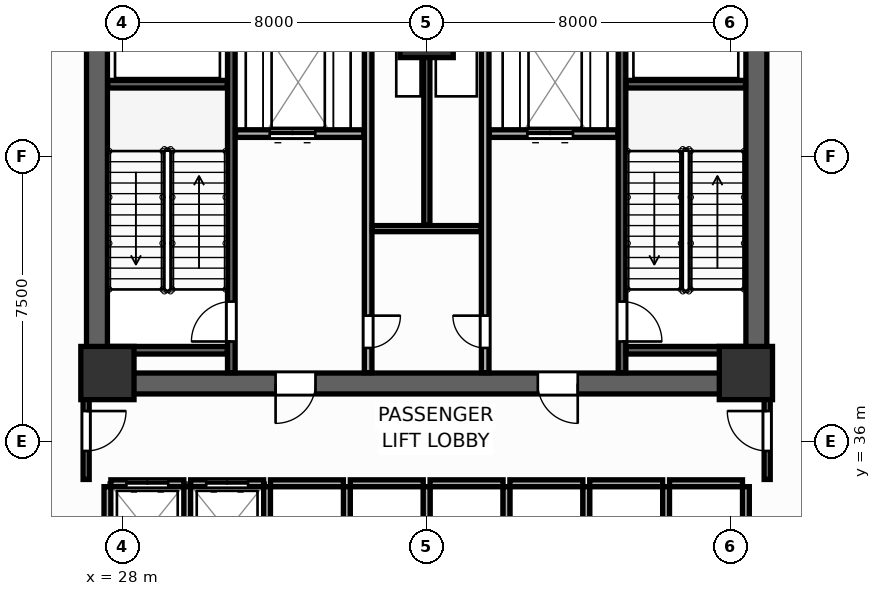
"""IFC4 building model, lengths in metres.
Left out: names, types, materials, properties, quantities, classifications, styles, units other than length and angle.
Written with IfcOpenShell. Run it as: python <this file> out.ifc"""

import sys

from ifc_helpers import new_model, si_unit, direction, frame, frame_2d, origin, origin_2d, place, context, subcontext, project, spatial, rectangle, extrude, source, transform, mapped, element, fill, save


model = new_model("IFC4")
c1 = context("Model", 3, precision=1e-05, world=origin(), true_north=direction((0.0, 1.0)))
c2 = subcontext(c1, "Body", "Model", "MODEL_VIEW")
j1 = project(units=[si_unit("LENGTHUNIT", "METRE"), si_unit("PLANEANGLEUNIT", "RADIAN")], contexts=[c1])
p1 = place(None, origin())
s1 = spatial("IfcSite", under=j1, at=p1, CompositionType="ELEMENT")
p2 = place(p1, origin())
s2 = spatial("IfcBuilding", under=s1, at=p2, CompositionType="ELEMENT")
p3 = place(p2, frame((0.0, 0.0, 14.4)))
s3 = spatial("IfcBuildingStorey", under=s2, at=p3, CompositionType="ELEMENT", Elevation=14.4)
p4 = place(p3, frame((27.05, 37.525, 0.0), z_axis=(0.0, 0.0, 1.0), x_axis=(1.0, 0.0, 0.0)))
e1 = element("IfcWall", 1, at=p4, inside=s3, PredefinedType="SHEAR", context=c2, shape_type="SweptSolid", body=[
    extrude(rectangle(XDim=17.9, YDim=0.55, at=frame_2d((8.95, 0.0))), origin(), (0.0, 0.0, 1.0), 4.8),
])
p5 = place(p4, frame((4.975, 0.0, 0.0)))
e2 = element("IfcOpeningElement", 2, at=p5, cuts=e1, PredefinedType="OPENING", context=c2, shape_type="SweptSolid", body=[
    extrude(rectangle(XDim=1.05, YDim=2.1, at=frame_2d((0.525, 1.05))), frame((0.0, 0.285, 0.0), z_axis=(0.0, -1.0, 0.0), x_axis=(1.0, 0.0, 0.0)), (0.0, 0.0, 1.0), 0.57),
])
p6 = place(p4, frame((11.875, 0.0, 0.0)))
e3 = element("IfcOpeningElement", 3, at=p6, cuts=e1, PredefinedType="OPENING", context=c2, shape_type="SweptSolid", body=[
    extrude(rectangle(XDim=1.05, YDim=2.1, at=frame_2d((0.525, 1.05))), frame((0.0, 0.285, 0.0), z_axis=(0.0, -1.0, 0.0), x_axis=(1.0, 0.0, 0.0)), (0.0, 0.0, 1.0), 0.57),
])
for number, where, z_axis, x_axis in (
    (4, (27.325, 37.8, 0.0), (0.0, 0.0, 1.0), (0.0, 1.0, 0.0)),
    (5, (44.675, 37.8, 0.0), (0.0, 0.0, 1.0), (0.0, 1.0, 0.0)),
):
    element("IfcWall", number, at=place(p3, frame(where, z_axis=z_axis, x_axis=x_axis)), inside=s3, PredefinedType="SHEAR", context=c2, shape_type="SweptSolid", body=[
        extrude(rectangle(XDim=9.0, YDim=0.55, at=frame_2d((4.5, 0.0))), origin(), (0.0, 0.0, 1.0), 4.8),
    ])
m1 = source(origin(), c2, "Body", "SweptSolid", [
    extrude(rectangle(XDim=1.4, YDim=1.4, at=origin_2d()), origin(), (0.0, 0.0, 1.0), 4.8),
])
for number, where, z_axis, x_axis in (
    (6, (27.6, 37.8, 0.0), (0.0, 0.0, 1.0), (1.0, 0.0, 0.0)),
    (7, (44.4, 37.8, 0.0), (0.0, 0.0, 1.0), (1.0, 0.0, 0.0)),
    (8, (36.0, 46.8, 0.0), (0.0, 0.0, 1.0), (1.0, 0.0, 0.0)),
):
    element("IfcColumn", number, at=place(p3, frame(where, z_axis=z_axis, x_axis=x_axis)), inside=s3, PredefinedType="COLUMN", context=c2, shape_type="MappedRepresentation", body=[
        mapped(m1, transform((0.0, 0.0, 0.0), scale=1.0)),
    ])
p7 = place(p3, frame((30.86, 37.81, 0.0), z_axis=(0.0, 0.0, 1.0), x_axis=(0.0, 1.0, 0.0)))
e9 = element("IfcWall", 9, at=p7, inside=s3, PredefinedType="SHEAR", context=c2, shape_type="SweptSolid", body=[
    extrude(rectangle(XDim=8.98, YDim=0.2, at=frame_2d((4.49, 0.0))), origin(), (0.0, 0.0, 1.0), 4.8),
])
p8 = place(p7, frame((0.82, 0.0, 0.0)))
e10 = element("IfcOpeningElement", 10, at=p8, cuts=e9, PredefinedType="OPENING", context=c2, shape_type="SweptSolid", body=[
    extrude(rectangle(XDim=1.05, YDim=2.1, at=frame_2d((0.525, 1.05))), frame((0.0, 0.11, 0.0), z_axis=(0.0, -1.0, 0.0), x_axis=(1.0, 0.0, 0.0)), (0.0, 0.0, 1.0), 0.22),
])
for number, where, z_axis, x_axis in (
    (11, (27.61, 45.4, 0.0), (0.0, 0.0, 1.0), (1.0, 0.0, 0.0)),
    (12, (27.61, 38.4, 0.0), (0.0, 0.0, 1.0), (1.0, 0.0, 0.0)),
):
    element("IfcWall", number, at=place(p3, frame(where, z_axis=z_axis, x_axis=x_axis)), inside=s3, PredefinedType="SHEAR", context=c2, shape_type="SweptSolid", body=[
        extrude(rectangle(XDim=3.14, YDim=0.2, at=frame_2d((1.57, 0.0))), origin(), (0.0, 0.0, 1.0), 4.8),
    ])
p9 = place(p3, frame((41.14, 37.81, 0.0), z_axis=(0.0, 0.0, 1.0), x_axis=(0.0, 1.0, 0.0)))
e13 = element("IfcWall", 13, at=p9, inside=s3, PredefinedType="SHEAR", context=c2, shape_type="SweptSolid", body=[
    extrude(rectangle(XDim=8.98, YDim=0.2, at=frame_2d((4.49, 0.0))), origin(), (0.0, 0.0, 1.0), 4.8),
])
p10 = place(p9, frame((0.82, 0.0, 0.0)))
e14 = element("IfcOpeningElement", 14, at=p10, cuts=e13, PredefinedType="OPENING", context=c2, shape_type="SweptSolid", body=[
    extrude(rectangle(XDim=1.05, YDim=2.1, at=frame_2d((0.525, 1.05))), frame((0.0, 0.11, 0.0), z_axis=(0.0, -1.0, 0.0), x_axis=(1.0, 0.0, 0.0)), (0.0, 0.0, 1.0), 0.22),
])
for number, where, z_axis, x_axis in (
    (15, (41.25, 45.4, 0.0), (0.0, 0.0, 1.0), (1.0, 0.0, 0.0)),
    (16, (41.25, 38.4, 0.0), (0.0, 0.0, 1.0), (1.0, 0.0, 0.0)),
):
    element("IfcWall", number, at=place(p3, frame(where, z_axis=z_axis, x_axis=x_axis)), inside=s3, PredefinedType="SHEAR", context=c2, shape_type="SweptSolid", body=[
        extrude(rectangle(XDim=3.14, YDim=0.2, at=frame_2d((1.57, 0.0))), origin(), (0.0, 0.0, 1.0), 4.8),
    ])
p11 = place(p3, frame((30.97, 44.1, 0.0), z_axis=(0.0, 0.0, 1.0), x_axis=(1.0, 0.0, 0.0)))
e17 = element("IfcWall", 17, at=p11, inside=s3, PredefinedType="PARTITIONING", context=c2, shape_type="SweptSolid", body=[
    extrude(rectangle(XDim=3.38, YDim=0.2, at=frame_2d((1.69, 0.0))), origin(), (0.0, 0.0, 1.0), 4.52),
])
p12 = place(p11, frame((0.9, 0.0, 0.0)))
e18 = element("IfcOpeningElement", 18, at=p12, cuts=e17, PredefinedType="OPENING", context=c2, shape_type="SweptSolid", body=[
    extrude(rectangle(XDim=1.2, YDim=2.1, at=frame_2d((0.6, 1.05))), frame((0.0, 0.11, 0.0), z_axis=(0.0, -1.0, 0.0), x_axis=(1.0, 0.0, 0.0)), (0.0, 0.0, 1.0), 0.22),
])
p13 = place(p3, frame((37.65, 44.1, 0.0), z_axis=(0.0, 0.0, 1.0), x_axis=(1.0, 0.0, 0.0)))
e19 = element("IfcWall", 19, at=p13, inside=s3, PredefinedType="PARTITIONING", context=c2, shape_type="SweptSolid", body=[
    extrude(rectangle(XDim=3.38, YDim=0.2, at=frame_2d((1.69, 0.0))), origin(), (0.0, 0.0, 1.0), 4.52),
])
p14 = place(p13, frame((1.0, 0.0, 0.0)))
e20 = element("IfcOpeningElement", 20, at=p14, cuts=e19, PredefinedType="OPENING", context=c2, shape_type="SweptSolid", body=[
    extrude(rectangle(XDim=1.2, YDim=2.1, at=frame_2d((0.6, 1.05))), frame((0.0, 0.11, 0.0), z_axis=(0.0, -1.0, 0.0), x_axis=(1.0, 0.0, 0.0)), (0.0, 0.0, 1.0), 0.22),
])
p15 = place(p3, frame((34.46, 37.81, 0.0), z_axis=(0.0, 0.0, 1.0), x_axis=(0.0, 1.0, 0.0)))
e21 = element("IfcWall", 21, at=p15, inside=s3, PredefinedType="PARTITIONING", context=c2, shape_type="SweptSolid", body=[
    extrude(rectangle(XDim=8.98, YDim=0.2, at=frame_2d((4.49, 0.0))), origin(), (0.0, 0.0, 1.0), 4.52),
])
p16 = place(p15, frame((0.65, 0.0, 0.0)))
e22 = element("IfcOpeningElement", 22, at=p16, cuts=e21, PredefinedType="OPENING", context=c2, shape_type="SweptSolid", body=[
    extrude(rectangle(XDim=0.85, YDim=2.05, at=frame_2d((0.425, 1.025))), frame((0.0, 0.11, 0.0), z_axis=(0.0, -1.0, 0.0), x_axis=(1.0, 0.0, 0.0)), (0.0, 0.0, 1.0), 0.22),
])
p17 = place(p3, frame((37.54, 37.81, 0.0), z_axis=(0.0, 0.0, 1.0), x_axis=(0.0, 1.0, 0.0)))
e23 = element("IfcWall", 23, at=p17, inside=s3, PredefinedType="PARTITIONING", context=c2, shape_type="SweptSolid", body=[
    extrude(rectangle(XDim=8.98, YDim=0.2, at=frame_2d((4.49, 0.0))), origin(), (0.0, 0.0, 1.0), 4.52),
])
p18 = place(p17, frame((0.65, 0.0, 0.0)))
e24 = element("IfcOpeningElement", 24, at=p18, cuts=e23, PredefinedType="OPENING", context=c2, shape_type="SweptSolid", body=[
    extrude(rectangle(XDim=0.85, YDim=2.05, at=frame_2d((0.425, 1.025))), frame((0.0, 0.11, 0.0), z_axis=(0.0, -1.0, 0.0), x_axis=(1.0, 0.0, 0.0)), (0.0, 0.0, 1.0), 0.22),
])
p19 = place(p3, frame((34.57, 41.6, 0.0), z_axis=(0.0, 0.0, 1.0), x_axis=(1.0, 0.0, 0.0)))
e25 = element("IfcWall", 25, at=p19, inside=s3, PredefinedType="PARTITIONING", context=c2, shape_type="SweptSolid", body=[
    extrude(rectangle(XDim=2.86, YDim=0.16, at=frame_2d((1.43, 0.0))), origin(), (0.0, 0.0, 1.0), 4.52),
])
p20 = place(p3, frame((36.005, 41.69, 0.0), z_axis=(0.0, 0.0, 1.0), x_axis=(0.0, 1.0, 0.0)))
e26 = element("IfcWall", 26, at=p20, inside=s3, PredefinedType="PARTITIONING", context=c2, shape_type="SweptSolid", body=[
    extrude(rectangle(XDim=5.1, YDim=0.16, at=frame_2d((2.55, 0.0))), origin(), (0.0, 0.0, 1.0), 4.52),
])
p21 = place(p3, frame((27.69, 34.9, 0.0), z_axis=(0.0, 0.0, 1.0), x_axis=(1.0, 0.0, 0.0)))
e27 = element("IfcWall", 27, at=p21, inside=s3, PredefinedType="PARTITIONING", context=c2, shape_type="SweptSolid", body=[
    extrude(rectangle(XDim=1.92, YDim=0.18, at=frame_2d((0.96, 0.0))), origin(), (0.0, 0.0, 1.0), 4.52),
])
p22 = place(p21, frame((0.41, 0.0, 0.0)))
e28 = element("IfcOpeningElement", 28, at=p22, cuts=e27, PredefinedType="OPENING", context=c2, shape_type="SweptSolid", body=[
    extrude(rectangle(XDim=1.1, YDim=2.1, at=frame_2d((0.55, 1.05))), frame((0.0, 0.1, 0.0), z_axis=(0.0, -1.0, 0.0), x_axis=(1.0, 0.0, 0.0)), (0.0, 0.0, 1.0), 0.2),
])
p23 = place(p3, frame((27.6, 32.49, 0.0), z_axis=(0.0, 0.0, 1.0), x_axis=(0.0, 1.0, 0.0)))
e29 = element("IfcWall", 29, at=p23, inside=s3, PredefinedType="PARTITIONING", context=c2, shape_type="SweptSolid", body=[
    extrude(rectangle(XDim=2.32, YDim=0.18, at=frame_2d((1.16, 0.0))), origin(), (0.0, 0.0, 1.0), 4.52),
])
p24 = place(p3, frame((29.79, 34.9, 0.0), z_axis=(0.0, 0.0, 1.0), x_axis=(1.0, 0.0, 0.0)))
e30 = element("IfcWall", 30, at=p24, inside=s3, PredefinedType="PARTITIONING", context=c2, shape_type="SweptSolid", body=[
    extrude(rectangle(XDim=1.92, YDim=0.18, at=frame_2d((0.96, 0.0))), origin(), (0.0, 0.0, 1.0), 4.52),
])
p25 = place(p24, frame((0.41, 0.0, 0.0)))
e31 = element("IfcOpeningElement", 31, at=p25, cuts=e30, PredefinedType="OPENING", context=c2, shape_type="SweptSolid", body=[
    extrude(rectangle(XDim=1.1, YDim=2.1, at=frame_2d((0.55, 1.05))), frame((0.0, 0.1, 0.0), z_axis=(0.0, -1.0, 0.0), x_axis=(1.0, 0.0, 0.0)), (0.0, 0.0, 1.0), 0.2),
])
p26 = place(p3, frame((29.7, 32.49, 0.0), z_axis=(0.0, 0.0, 1.0), x_axis=(0.0, 1.0, 0.0)))
e32 = element("IfcWall", 32, at=p26, inside=s3, PredefinedType="PARTITIONING", context=c2, shape_type="SweptSolid", body=[
    extrude(rectangle(XDim=2.32, YDim=0.18, at=frame_2d((1.16, 0.0))), origin(), (0.0, 0.0, 1.0), 4.52),
])
p27 = place(p3, frame((31.89, 34.9, 0.0), z_axis=(0.0, 0.0, 1.0), x_axis=(1.0, 0.0, 0.0)))
e33 = element("IfcWall", 33, at=p27, inside=s3, PredefinedType="PARTITIONING", context=c2, shape_type="SweptSolid", body=[
    extrude(rectangle(XDim=1.92, YDim=0.18, at=frame_2d((0.96, 0.0))), origin(), (0.0, 0.0, 1.0), 4.52),
])
p28 = place(p3, frame((31.8, 32.49, 0.0), z_axis=(0.0, 0.0, 1.0), x_axis=(0.0, 1.0, 0.0)))
e34 = element("IfcWall", 34, at=p28, inside=s3, PredefinedType="PARTITIONING", context=c2, shape_type="SweptSolid", body=[
    extrude(rectangle(XDim=2.32, YDim=0.18, at=frame_2d((1.16, 0.0))), origin(), (0.0, 0.0, 1.0), 4.52),
])
p29 = place(p3, frame((33.99, 34.9, 0.0), z_axis=(0.0, 0.0, 1.0), x_axis=(1.0, 0.0, 0.0)))
e35 = element("IfcWall", 35, at=p29, inside=s3, PredefinedType="PARTITIONING", context=c2, shape_type="SweptSolid", body=[
    extrude(rectangle(XDim=1.92, YDim=0.18, at=frame_2d((0.96, 0.0))), origin(), (0.0, 0.0, 1.0), 4.52),
])
p30 = place(p3, frame((33.9, 32.49, 0.0), z_axis=(0.0, 0.0, 1.0), x_axis=(0.0, 1.0, 0.0)))
e36 = element("IfcWall", 36, at=p30, inside=s3, PredefinedType="PARTITIONING", context=c2, shape_type="SweptSolid", body=[
    extrude(rectangle(XDim=2.32, YDim=0.18, at=frame_2d((1.16, 0.0))), origin(), (0.0, 0.0, 1.0), 4.52),
])
p31 = place(p3, frame((36.09, 34.9, 0.0), z_axis=(0.0, 0.0, 1.0), x_axis=(1.0, 0.0, 0.0)))
e37 = element("IfcWall", 37, at=p31, inside=s3, PredefinedType="PARTITIONING", context=c2, shape_type="SweptSolid", body=[
    extrude(rectangle(XDim=1.92, YDim=0.18, at=frame_2d((0.96, 0.0))), origin(), (0.0, 0.0, 1.0), 4.52),
])
p32 = place(p3, frame((36.0, 32.49, 0.0), z_axis=(0.0, 0.0, 1.0), x_axis=(0.0, 1.0, 0.0)))
e38 = element("IfcWall", 38, at=p32, inside=s3, PredefinedType="PARTITIONING", context=c2, shape_type="SweptSolid", body=[
    extrude(rectangle(XDim=2.32, YDim=0.18, at=frame_2d((1.16, 0.0))), origin(), (0.0, 0.0, 1.0), 4.52),
])
p33 = place(p3, frame((38.19, 34.9, 0.0), z_axis=(0.0, 0.0, 1.0), x_axis=(1.0, 0.0, 0.0)))
e39 = element("IfcWall", 39, at=p33, inside=s3, PredefinedType="PARTITIONING", context=c2, shape_type="SweptSolid", body=[
    extrude(rectangle(XDim=1.92, YDim=0.18, at=frame_2d((0.96, 0.0))), origin(), (0.0, 0.0, 1.0), 4.52),
])
p34 = place(p3, frame((38.1, 32.49, 0.0), z_axis=(0.0, 0.0, 1.0), x_axis=(0.0, 1.0, 0.0)))
e40 = element("IfcWall", 40, at=p34, inside=s3, PredefinedType="PARTITIONING", context=c2, shape_type="SweptSolid", body=[
    extrude(rectangle(XDim=2.32, YDim=0.18, at=frame_2d((1.16, 0.0))), origin(), (0.0, 0.0, 1.0), 4.52),
])
p35 = place(p3, frame((40.29, 34.9, 0.0), z_axis=(0.0, 0.0, 1.0), x_axis=(1.0, 0.0, 0.0)))
e41 = element("IfcWall", 41, at=p35, inside=s3, PredefinedType="PARTITIONING", context=c2, shape_type="SweptSolid", body=[
    extrude(rectangle(XDim=1.92, YDim=0.18, at=frame_2d((0.96, 0.0))), origin(), (0.0, 0.0, 1.0), 4.52),
])
p36 = place(p3, frame((40.2, 32.49, 0.0), z_axis=(0.0, 0.0, 1.0), x_axis=(0.0, 1.0, 0.0)))
e42 = element("IfcWall", 42, at=p36, inside=s3, PredefinedType="PARTITIONING", context=c2, shape_type="SweptSolid", body=[
    extrude(rectangle(XDim=2.32, YDim=0.18, at=frame_2d((1.16, 0.0))), origin(), (0.0, 0.0, 1.0), 4.52),
])
p37 = place(p3, frame((42.39, 34.9, 0.0), z_axis=(0.0, 0.0, 1.0), x_axis=(1.0, 0.0, 0.0)))
e43 = element("IfcWall", 43, at=p37, inside=s3, PredefinedType="PARTITIONING", context=c2, shape_type="SweptSolid", body=[
    extrude(rectangle(XDim=1.92, YDim=0.18, at=frame_2d((0.96, 0.0))), origin(), (0.0, 0.0, 1.0), 4.52),
])
for number, where, z_axis, x_axis in (
    (44, (42.3, 32.49, 0.0), (0.0, 0.0, 1.0), (0.0, 1.0, 0.0)),
    (45, (44.4, 32.49, 0.0), (0.0, 0.0, 1.0), (0.0, 1.0, 0.0)),
):
    element("IfcWall", number, at=place(p3, frame(where, z_axis=z_axis, x_axis=x_axis)), inside=s3, PredefinedType="PARTITIONING", context=c2, shape_type="SweptSolid", body=[
        extrude(rectangle(XDim=2.32, YDim=0.18, at=frame_2d((1.16, 0.0))), origin(), (0.0, 0.0, 1.0), 4.52),
    ])
p38 = place(p3, frame((27.04, 35.0, 0.0), z_axis=(0.0, 0.0, 1.0), x_axis=(0.0, 1.0, 0.0)))
e46 = element("IfcWall", 46, at=p38, inside=s3, PredefinedType="PARTITIONING", context=c2, shape_type="SweptSolid", body=[
    extrude(rectangle(XDim=2.65, YDim=0.16, at=frame_2d((1.325, 0.0))), origin(), (0.0, 0.0, 1.0), 4.52),
])
p39 = place(p38, frame((0.75, 0.0, 0.0)))
e47 = element("IfcOpeningElement", 47, at=p39, cuts=e46, PredefinedType="OPENING", context=c2, shape_type="SweptSolid", body=[
    extrude(rectangle(XDim=1.05, YDim=2.1, at=frame_2d((0.525, 1.05))), frame((0.0, 0.09, 0.0), z_axis=(0.0, -1.0, 0.0), x_axis=(1.0, 0.0, 0.0)), (0.0, 0.0, 1.0), 0.18),
])
p40 = place(p3, frame((44.96, 35.0, 0.0), z_axis=(0.0, 0.0, 1.0), x_axis=(0.0, 1.0, 0.0)))
e48 = element("IfcWall", 48, at=p40, inside=s3, PredefinedType="PARTITIONING", context=c2, shape_type="SweptSolid", body=[
    extrude(rectangle(XDim=2.65, YDim=0.16, at=frame_2d((1.325, 0.0))), origin(), (0.0, 0.0, 1.0), 4.52),
])
p41 = place(p40, frame((0.75, 0.0, 0.0)))
e49 = element("IfcOpeningElement", 49, at=p41, cuts=e48, PredefinedType="OPENING", context=c2, shape_type="SweptSolid", body=[
    extrude(rectangle(XDim=1.05, YDim=2.1, at=frame_2d((0.525, 1.05))), frame((0.0, 0.09, 0.0), z_axis=(0.0, -1.0, 0.0), x_axis=(1.0, 0.0, 0.0)), (0.0, 0.0, 1.0), 0.18),
])
p42 = place(p8, origin())
e50 = element("IfcDoor", 50, at=p42, inside=s3, OperationType="SINGLE_SWING_LEFT", PredefinedType="DOOR", context=c2, shape_type="SweptSolid", body=[
    extrude(rectangle(XDim=1.05, YDim=2.1, at=frame_2d((0.525, 1.05))), frame((0.0, 0.025, 0.0), z_axis=(0.0, -1.0, 0.0), x_axis=(1.0, 0.0, 0.0)), (0.0, 0.0, 1.0), 0.05),
])
fill(e10, e50)
p43 = place(p10, frame((1.05, 0.0, 0.0), z_axis=(0.0, 0.0, 1.0), x_axis=(-1.0, 0.0, 0.0)))
e51 = element("IfcDoor", 51, at=p43, inside=s3, OperationType="SINGLE_SWING_RIGHT", PredefinedType="DOOR", context=c2, shape_type="SweptSolid", body=[
    extrude(rectangle(XDim=1.05, YDim=2.1, at=frame_2d((0.525, 1.05))), frame((0.0, 0.025, 0.0), z_axis=(0.0, -1.0, 0.0), x_axis=(1.0, 0.0, 0.0)), (0.0, 0.0, 1.0), 0.05),
])
fill(e14, e51)
p44 = place(p12, origin())
e52 = element("IfcDoor", 52, at=p44, inside=s3, OperationType="DOUBLE_DOOR_SLIDING", PredefinedType="DOOR", context=c2, shape_type="SweptSolid", body=[
    extrude(rectangle(XDim=1.2, YDim=2.1, at=frame_2d((0.6, 1.05))), frame((0.0, 0.025, 0.0), z_axis=(0.0, -1.0, 0.0), x_axis=(1.0, 0.0, 0.0)), (0.0, 0.0, 1.0), 0.05),
])
fill(e18, e52)
p45 = place(p14, origin())
e53 = element("IfcDoor", 53, at=p45, inside=s3, OperationType="DOUBLE_DOOR_SLIDING", PredefinedType="DOOR", context=c2, shape_type="SweptSolid", body=[
    extrude(rectangle(XDim=1.2, YDim=2.1, at=frame_2d((0.6, 1.05))), frame((0.0, 0.025, 0.0), z_axis=(0.0, -1.0, 0.0), x_axis=(1.0, 0.0, 0.0)), (0.0, 0.0, 1.0), 0.05),
])
fill(e20, e53)
p46 = place(p16, frame((0.85, 0.0, 0.0), z_axis=(0.0, 0.0, 1.0), x_axis=(-1.0, 0.0, 0.0)))
e54 = element("IfcDoor", 54, at=p46, inside=s3, OperationType="SINGLE_SWING_LEFT", PredefinedType="DOOR", context=c2, shape_type="SweptSolid", body=[
    extrude(rectangle(XDim=0.85, YDim=2.05, at=frame_2d((0.425, 1.025))), frame((0.0, 0.025, 0.0), z_axis=(0.0, -1.0, 0.0), x_axis=(1.0, 0.0, 0.0)), (0.0, 0.0, 1.0), 0.05),
])
fill(e22, e54)
p47 = place(p18, origin())
e55 = element("IfcDoor", 55, at=p47, inside=s3, OperationType="SINGLE_SWING_RIGHT", PredefinedType="DOOR", context=c2, shape_type="SweptSolid", body=[
    extrude(rectangle(XDim=0.85, YDim=2.05, at=frame_2d((0.425, 1.025))), frame((0.0, 0.025, 0.0), z_axis=(0.0, -1.0, 0.0), x_axis=(1.0, 0.0, 0.0)), (0.0, 0.0, 1.0), 0.05),
])
fill(e24, e55)
p48 = place(p22, origin())
e56 = element("IfcDoor", 56, at=p48, inside=s3, OperationType="DOUBLE_DOOR_SLIDING", PredefinedType="DOOR", context=c2, shape_type="SweptSolid", body=[
    extrude(rectangle(XDim=1.1, YDim=2.1, at=frame_2d((0.55, 1.05))), frame((0.0, 0.025, 0.0), z_axis=(0.0, -1.0, 0.0), x_axis=(1.0, 0.0, 0.0)), (0.0, 0.0, 1.0), 0.05),
])
fill(e28, e56)
p49 = place(p25, origin())
e57 = element("IfcDoor", 57, at=p49, inside=s3, OperationType="DOUBLE_DOOR_SLIDING", PredefinedType="DOOR", context=c2, shape_type="SweptSolid", body=[
    extrude(rectangle(XDim=1.1, YDim=2.1, at=frame_2d((0.55, 1.05))), frame((0.0, 0.025, 0.0), z_axis=(0.0, -1.0, 0.0), x_axis=(1.0, 0.0, 0.0)), (0.0, 0.0, 1.0), 0.05),
])
fill(e31, e57)
p50 = place(p39, frame((1.05, 0.0, 0.0), z_axis=(0.0, 0.0, 1.0), x_axis=(-1.0, 0.0, 0.0)))
e58 = element("IfcDoor", 58, at=p50, inside=s3, OperationType="SINGLE_SWING_LEFT", PredefinedType="DOOR", context=c2, shape_type="SweptSolid", body=[
    extrude(rectangle(XDim=1.05, YDim=2.1, at=frame_2d((0.525, 1.05))), frame((0.0, 0.025, 0.0), z_axis=(0.0, -1.0, 0.0), x_axis=(1.0, 0.0, 0.0)), (0.0, 0.0, 1.0), 0.05),
])
fill(e47, e58)
p51 = place(p41, origin())
e59 = element("IfcDoor", 59, at=p51, inside=s3, OperationType="SINGLE_SWING_RIGHT", PredefinedType="DOOR", context=c2, shape_type="SweptSolid", body=[
    extrude(rectangle(XDim=1.05, YDim=2.1, at=frame_2d((0.525, 1.05))), frame((0.0, 0.025, 0.0), z_axis=(0.0, -1.0, 0.0), x_axis=(1.0, 0.0, 0.0)), (0.0, 0.0, 1.0), 0.05),
])
fill(e49, e59)
p52 = place(p5, frame((1.05, 0.0, 0.0), z_axis=(0.0, 0.0, 1.0), x_axis=(-1.0, 0.0, 0.0)))
e60 = element("IfcDoor", 60, at=p52, inside=s3, OperationType="SINGLE_SWING_RIGHT", PredefinedType="DOOR", context=c2, shape_type="SweptSolid", body=[
    extrude(rectangle(XDim=1.05, YDim=2.1, at=frame_2d((0.525, 1.05))), frame((0.0, 0.025, 0.0), z_axis=(0.0, -1.0, 0.0), x_axis=(1.0, 0.0, 0.0)), (0.0, 0.0, 1.0), 0.05),
])
fill(e2, e60)
p53 = place(p6, frame((1.05, 0.0, 0.0), z_axis=(0.0, 0.0, 1.0), x_axis=(-1.0, 0.0, 0.0)))
e61 = element("IfcDoor", 61, at=p53, inside=s3, OperationType="SINGLE_SWING_LEFT", PredefinedType="DOOR", context=c2, shape_type="SweptSolid", body=[
    extrude(rectangle(XDim=1.05, YDim=2.1, at=frame_2d((0.525, 1.05))), frame((0.0, 0.025, 0.0), z_axis=(0.0, -1.0, 0.0), x_axis=(1.0, 0.0, 0.0)), (0.0, 0.0, 1.0), 0.05),
])
fill(e3, e61)
save(model, sys.argv[1])
